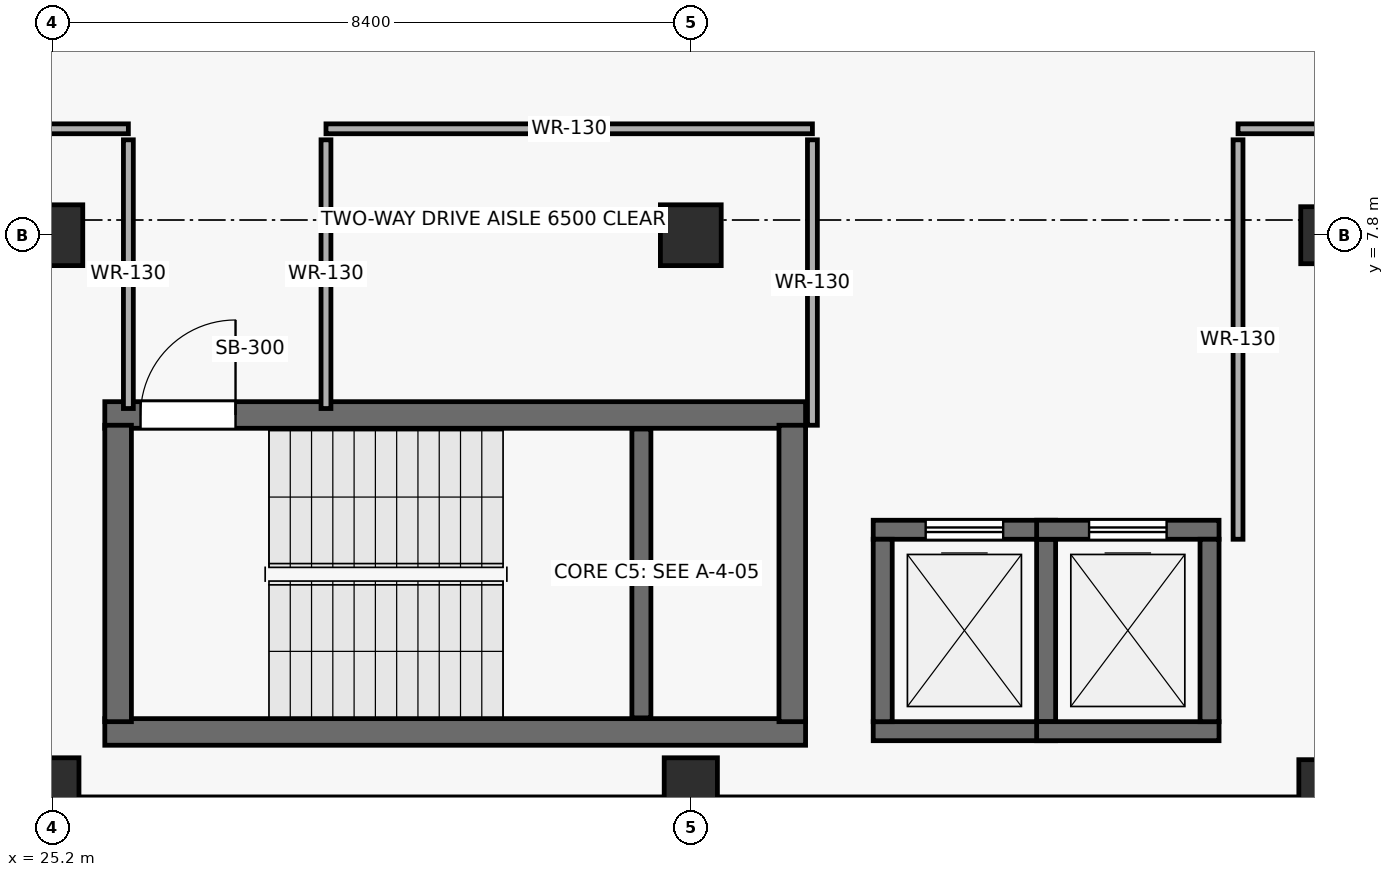
"""IFC4 building model, lengths in metres.
Left out: names, types, materials, properties, quantities, classifications, styles, units other than length and angle.
Written with IfcOpenShell. Run it as: python <this file> out.ifc"""

import sys

from ifc_helpers import new_model, si_unit, direction, frame, frame_2d, origin, origin_2d, place, context, subcontext, project, spatial, rectangle, extrude, element, fill, save


model = new_model("IFC4")
c1 = context("Model", 3, precision=1e-05, world=origin(), true_north=direction((0.0, 1.0)))
c2 = subcontext(c1, "Body", "Model", "MODEL_VIEW")
j1 = project(units=[si_unit("LENGTHUNIT", "METRE"), si_unit("PLANEANGLEUNIT", "RADIAN")], contexts=[c1])
p1 = place(None, origin())
s1 = spatial("IfcSite", under=j1, at=p1, CompositionType="ELEMENT")
p2 = place(p1, origin())
s2 = spatial("IfcBuilding", under=s1, at=p2, CompositionType="ELEMENT")
p3 = place(p2, frame((0.0, 0.0, -4.5)))
s3 = spatial("IfcBuildingStorey", under=s2, at=p3, CompositionType="ELEMENT", Elevation=-4.5)
p4 = place(p3, frame((25.2, 0.5, -0.3), z_axis=(0.0, 0.0, 1.0), x_axis=(1.0, 0.0, 0.0)))
e1 = element("IfcColumn", 1, at=p4, inside=s3, PredefinedType="COLUMN", context=c2, shape_type="SweptSolid", body=[
    extrude(rectangle(XDim=0.7, YDim=0.85, at=origin_2d()), origin(), (0.0, 0.0, 1.0), 4.8),
])
p5 = place(p3, frame((25.2, 7.8, -0.3), z_axis=(0.0, 0.0, 1.0), x_axis=(1.0, 0.0, 0.0)))
e2 = element("IfcColumn", 2, at=p5, inside=s3, PredefinedType="COLUMN", context=c2, shape_type="SweptSolid", body=[
    extrude(rectangle(XDim=0.8, YDim=0.8, at=origin_2d()), origin(), (0.0, 0.0, 1.0), 4.8),
])
p6 = place(p3, frame((33.6, 0.5, -0.3), z_axis=(0.0, 0.0, 1.0), x_axis=(1.0, 0.0, 0.0)))
e3 = element("IfcColumn", 3, at=p6, inside=s3, PredefinedType="COLUMN", context=c2, shape_type="SweptSolid", body=[
    extrude(rectangle(XDim=0.7, YDim=0.85, at=origin_2d()), origin(), (0.0, 0.0, 1.0), 4.8),
])
for number, where, z_axis, x_axis in (
    (4, (33.6, 7.8, -0.3), (0.0, 0.0, 1.0), (1.0, 0.0, 0.0)),
    (5, (42.0, 0.5, -0.3), (0.0, 0.0, 1.0), (1.0, 0.0, 0.0)),
):
    element("IfcColumn", number, at=place(p3, frame(where, z_axis=z_axis, x_axis=x_axis)), inside=s3, PredefinedType="COLUMN", context=c2, shape_type="SweptSolid", body=[
        extrude(rectangle(XDim=0.8, YDim=0.8, at=origin_2d()), origin(), (0.0, 0.0, 1.0), 4.8),
    ])
p7 = place(p3, frame((42.0, 7.8, -0.3), z_axis=(0.0, 0.0, 1.0), x_axis=(1.0, 0.0, 0.0)))
e6 = element("IfcColumn", 6, at=p7, inside=s3, PredefinedType="COLUMN", context=c2, shape_type="SweptSolid", body=[
    extrude(rectangle(XDim=0.75, YDim=0.75, at=origin_2d()), origin(), (0.0, 0.0, 1.0), 4.8),
])
p8 = place(p3, frame((58.8, 0.22, 0.0), z_axis=(0.0, 0.0, 1.0), x_axis=(-1.0, 0.0, 0.0)))
e7 = element("IfcWall", 7, at=p8, inside=s3, PredefinedType="SOLIDWALL", context=c2, shape_type="SweptSolid", body=[
    extrude(rectangle(XDim=58.58, YDim=0.38, at=frame_2d((29.29, 0.0))), origin(), (0.0, 0.0, 1.0), 4.22),
])
p9 = place(p3, frame((25.89, 1.265, 0.0), z_axis=(0.0, 0.0, 1.0), x_axis=(1.0, 0.0, 0.0)))
e8 = element("IfcWall", 8, at=p9, inside=s3, PredefinedType="SHEAR", context=c2, shape_type="SweptSolid", body=[
    extrude(rectangle(XDim=9.22, YDim=0.35, at=frame_2d((4.61, 0.0))), origin(), (0.0, 0.0, 1.0), 4.22),
])
p10 = place(p3, frame((35.11, 5.435, 0.0), z_axis=(0.0, 0.0, 1.0), x_axis=(-1.0, 0.0, 0.0)))
e9 = element("IfcWall", 9, at=p10, inside=s3, PredefinedType="SHEAR", context=c2, shape_type="SweptSolid", body=[
    extrude(rectangle(XDim=9.22, YDim=0.35, at=frame_2d((4.61, 0.0))), origin(), (0.0, 0.0, 1.0), 4.22),
])
p11 = place(p10, frame((7.5, 0.0, 0.0)))
e10 = element("IfcOpeningElement", 10, at=p11, cuts=e9, PredefinedType="OPENING", context=c2, shape_type="SweptSolid", body=[
    extrude(rectangle(XDim=1.25, YDim=2.2, at=frame_2d((0.625, 1.1))), frame((0.0, 0.185, 0.0), z_axis=(0.0, -1.0, 0.0), x_axis=(1.0, 0.0, 0.0)), (0.0, 0.0, 1.0), 0.37),
])
for number, where, z_axis, x_axis in (
    (11, (26.065, 1.4, 0.0), (0.0, 0.0, 1.0), (0.0, 1.0, 0.0)),
    (12, (34.935, 5.3, 0.0), (0.0, 0.0, 1.0), (0.0, -1.0, 0.0)),
):
    element("IfcWall", number, at=place(p3, frame(where, z_axis=z_axis, x_axis=x_axis)), inside=s3, PredefinedType="SHEAR", context=c2, shape_type="SweptSolid", body=[
        extrude(rectangle(XDim=3.9, YDim=0.35, at=frame_2d((1.95, 0.0))), origin(), (0.0, 0.0, 1.0), 4.22),
    ])
p12 = place(p3, frame((32.95, 1.45, 0.0), z_axis=(0.0, 0.0, 1.0), x_axis=(0.0, 1.0, 0.0)))
e13 = element("IfcWall", 13, at=p12, inside=s3, PredefinedType="SHEAR", context=c2, shape_type="SweptSolid", body=[
    extrude(rectangle(XDim=3.8, YDim=0.25, at=frame_2d((1.9, 0.0))), origin(), (0.0, 0.0, 1.0), 2.07),
])
p13 = place(p3, frame((36.0, 1.275, 0.0), z_axis=(0.0, 0.0, 1.0), x_axis=(1.0, 0.0, 0.0)))
e14 = element("IfcWall", 14, at=p13, inside=s3, PredefinedType="SHEAR", context=c2, shape_type="SweptSolid", body=[
    extrude(rectangle(XDim=2.4, YDim=0.25, at=frame_2d((1.2, 0.0))), origin(), (0.0, 0.0, 1.0), 4.22),
])
p14 = place(p3, frame((38.4, 3.925, 0.0), z_axis=(0.0, 0.0, 1.0), x_axis=(-1.0, 0.0, 0.0)))
e15 = element("IfcWall", 15, at=p14, inside=s3, PredefinedType="SHEAR", context=c2, shape_type="SweptSolid", body=[
    extrude(rectangle(XDim=2.4, YDim=0.25, at=frame_2d((1.2, 0.0))), origin(), (0.0, 0.0, 1.0), 4.22),
])
p15 = place(p14, frame((0.69, 0.0, 0.0)))
e16 = element("IfcOpeningElement", 16, at=p15, cuts=e15, PredefinedType="OPENING", context=c2, shape_type="SweptSolid", body=[
    extrude(rectangle(XDim=1.02, YDim=2.15, at=frame_2d((0.51, 1.075))), frame((0.0, 0.135, 0.0), z_axis=(0.0, -1.0, 0.0), x_axis=(1.0, 0.0, 0.0)), (0.0, 0.0, 1.0), 0.27),
])
for number, where, z_axis, x_axis in (
    (17, (36.125, 1.4, 0.0), (0.0, 0.0, 1.0), (0.0, 1.0, 0.0)),
    (18, (38.275, 3.8, 0.0), (0.0, 0.0, 1.0), (0.0, -1.0, 0.0)),
    (19, (38.15, 1.275, 0.0), (0.0, 0.0, 1.0), (1.0, 0.0, 0.0)),
):
    element("IfcWall", number, at=place(p3, frame(where, z_axis=z_axis, x_axis=x_axis)), inside=s3, PredefinedType="SHEAR", context=c2, shape_type="SweptSolid", body=[
        extrude(rectangle(XDim=2.4, YDim=0.25, at=frame_2d((1.2, 0.0))), origin(), (0.0, 0.0, 1.0), 4.22),
    ])
p16 = place(p3, frame((40.55, 3.925, 0.0), z_axis=(0.0, 0.0, 1.0), x_axis=(-1.0, 0.0, 0.0)))
e20 = element("IfcWall", 20, at=p16, inside=s3, PredefinedType="SHEAR", context=c2, shape_type="SweptSolid", body=[
    extrude(rectangle(XDim=2.4, YDim=0.25, at=frame_2d((1.2, 0.0))), origin(), (0.0, 0.0, 1.0), 4.22),
])
p17 = place(p16, frame((0.69, 0.0, 0.0)))
e21 = element("IfcOpeningElement", 21, at=p17, cuts=e20, PredefinedType="OPENING", context=c2, shape_type="SweptSolid", body=[
    extrude(rectangle(XDim=1.02, YDim=2.15, at=frame_2d((0.51, 1.075))), frame((0.0, 0.135, 0.0), z_axis=(0.0, -1.0, 0.0), x_axis=(1.0, 0.0, 0.0)), (0.0, 0.0, 1.0), 0.27),
])
p18 = place(p3, frame((40.425, 3.8, 0.0), z_axis=(0.0, 0.0, 1.0), x_axis=(0.0, -1.0, 0.0)))
e22 = element("IfcWall", 22, at=p18, inside=s3, PredefinedType="SHEAR", context=c2, shape_type="SweptSolid", body=[
    extrude(rectangle(XDim=2.4, YDim=0.25, at=frame_2d((1.2, 0.0))), origin(), (0.0, 0.0, 1.0), 4.22),
])
p19 = place(p3, frame((40.8, 9.2, 0.0), z_axis=(0.0, 0.0, 1.0), x_axis=(1.0, 0.0, 0.0)))
e23 = element("IfcWall", 23, at=p19, inside=s3, PredefinedType="PARTITIONING", context=c2, shape_type="SweptSolid", body=[
    extrude(rectangle(XDim=35.4, YDim=0.13, at=frame_2d((17.7, 0.0))), origin(), (0.0, 0.0, 1.0), 4.22),
])
p20 = place(p19, frame((14.856, 0.0, 0.0)))
e24 = element("IfcOpeningElement", 24, at=p20, cuts=e23, PredefinedType="OPENING", context=c2, shape_type="SweptSolid", body=[
    extrude(rectangle(XDim=1.44, YDim=2.34, at=frame_2d((0.72, 1.17))), frame((0.0, 0.075, 0.0), z_axis=(0.0, -1.0, 0.0), x_axis=(1.0, 0.0, 0.0)), (0.0, 0.0, 1.0), 0.15),
])
p21 = place(p3, frame((18.18, 9.2, 0.0), z_axis=(0.0, 0.0, 1.0), x_axis=(1.0, 0.0, 0.0)))
e25 = element("IfcWall", 25, at=p21, inside=s3, PredefinedType="PARTITIONING", context=c2, shape_type="SweptSolid", body=[
    extrude(rectangle(XDim=8.02, YDim=0.13, at=frame_2d((4.01, 0.0))), origin(), (0.0, 0.0, 1.0), 4.22),
])
p22 = place(p3, frame((28.8, 9.2, 0.0), z_axis=(0.0, 0.0, 1.0), x_axis=(1.0, 0.0, 0.0)))
e26 = element("IfcWall", 26, at=p22, inside=s3, PredefinedType="PARTITIONING", context=c2, shape_type="SweptSolid", body=[
    extrude(rectangle(XDim=6.4, YDim=0.13, at=frame_2d((3.2, 0.0))), origin(), (0.0, 0.0, 1.0), 4.22),
])
p23 = place(p3, frame((35.2, 9.055, 0.0), z_axis=(0.0, 0.0, 1.0), x_axis=(0.0, -1.0, 0.0)))
e27 = element("IfcWall", 27, at=p23, inside=s3, PredefinedType="PARTITIONING", context=c2, shape_type="SweptSolid", body=[
    extrude(rectangle(XDim=3.755, YDim=0.13, at=frame_2d((1.877, 0.0))), origin(), (0.0, 0.0, 1.0), 4.22),
])
p24 = place(p3, frame((40.8, 3.8, 0.0), z_axis=(0.0, 0.0, 1.0), x_axis=(0.0, 1.0, 0.0)))
e28 = element("IfcWall", 28, at=p24, inside=s3, PredefinedType="PARTITIONING", context=c2, shape_type="SweptSolid", body=[
    extrude(rectangle(XDim=5.255, YDim=0.13, at=frame_2d((2.627, 0.0))), origin(), (0.0, 0.0, 1.0), 4.22),
])
for number, where, z_axis, x_axis in (
    (29, (26.2, 9.055, 0.0), (0.0, 0.0, 1.0), (0.0, -1.0, 0.0)),
    (30, (28.8, 5.52, 0.0), (0.0, 0.0, 1.0), (0.0, 1.0, 0.0)),
):
    element("IfcWall", number, at=place(p3, frame(where, z_axis=z_axis, x_axis=x_axis)), inside=s3, PredefinedType="PARTITIONING", context=c2, shape_type="SweptSolid", body=[
        extrude(rectangle(XDim=3.535, YDim=0.13, at=frame_2d((1.768, 0.0))), origin(), (0.0, 0.0, 1.0), 4.22),
    ])
p25 = place(p11, origin())
e31 = element("IfcDoor", 31, at=p25, inside=s3, OperationType="SINGLE_SWING_RIGHT", PredefinedType="DOOR", context=c2, shape_type="SweptSolid", body=[
    extrude(rectangle(XDim=1.25, YDim=2.2, at=frame_2d((0.625, 1.1))), frame((0.0, 0.025, 0.0), z_axis=(0.0, -1.0, 0.0), x_axis=(1.0, 0.0, 0.0)), (0.0, 0.0, 1.0), 0.05),
])
fill(e10, e31)
p26 = place(p15, origin())
e32 = element("IfcDoor", 32, at=p26, inside=s3, OperationType="SLIDING_TO_LEFT", PredefinedType="DOOR", context=c2, shape_type="SweptSolid", body=[
    extrude(rectangle(XDim=1.02, YDim=2.15, at=frame_2d((0.51, 1.075))), frame((0.0, 0.025, 0.0), z_axis=(0.0, -1.0, 0.0), x_axis=(1.0, 0.0, 0.0)), (0.0, 0.0, 1.0), 0.05),
])
fill(e16, e32)
p27 = place(p17, origin())
e33 = element("IfcDoor", 33, at=p27, inside=s3, OperationType="SLIDING_TO_LEFT", PredefinedType="DOOR", context=c2, shape_type="SweptSolid", body=[
    extrude(rectangle(XDim=1.02, YDim=2.15, at=frame_2d((0.51, 1.075))), frame((0.0, 0.025, 0.0), z_axis=(0.0, -1.0, 0.0), x_axis=(1.0, 0.0, 0.0)), (0.0, 0.0, 1.0), 0.05),
])
fill(e21, e33)
save(model, sys.argv[1])
